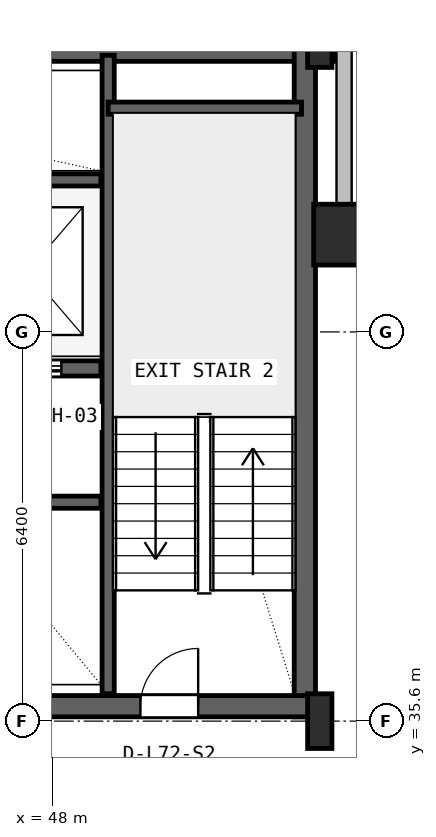
"""IFC4 building model, lengths in metres.
Left out: names, types, materials, properties, quantities, classifications, styles, units other than length and angle.
Written with IfcOpenShell. Run it as: python <this file> out.ifc"""

import sys

from ifc_helpers import new_model, si_unit, direction, frame, frame_2d, origin, origin_2d, place, context, subcontext, project, spatial, rectangle, hollow_rectangle, i_section, extrude, source, transform, mapped, element, fill, save


model = new_model("IFC4")
c1 = context("Model", 3, precision=1e-05, world=origin(), true_north=direction((0.0, 1.0)))
c2 = subcontext(c1, "Body", "Model", "MODEL_VIEW")
j1 = project(units=[si_unit("LENGTHUNIT", "METRE"), si_unit("PLANEANGLEUNIT", "RADIAN")], contexts=[c1])
p1 = place(None, origin())
s1 = spatial("IfcSite", under=j1, at=p1, CompositionType="ELEMENT")
p2 = place(p1, origin())
s2 = spatial("IfcBuilding", under=s1, at=p2, CompositionType="ELEMENT")
p3 = place(p2, frame((0.0, 0.0, 288.8)))
s3 = spatial("IfcBuildingStorey", under=s2, at=p3, CompositionType="ELEMENT", Elevation=288.8)
p4 = place(p3, frame((15.325, 46.625, 0.0), z_axis=(0.0, 0.0, 1.0), x_axis=(1.0, 0.0, 0.0)))
e1 = element("IfcWall", 1, at=p4, inside=s3, PredefinedType="SHEAR", context=c2, shape_type="SweptSolid", body=[
    extrude(rectangle(XDim=37.35, YDim=0.35, at=frame_2d((18.675, 0.0))), origin(), (0.0, 0.0, 1.0), 3.55),
])
p5 = place(p3, frame((52.155, 35.67, 0.0), z_axis=(0.0, 0.0, 1.0), x_axis=(0.0, 1.0, 0.0)))
e2 = element("IfcWall", 2, at=p5, inside=s3, PredefinedType="SHEAR", context=c2, shape_type="SweptSolid", body=[
    extrude(rectangle(XDim=11.13, YDim=0.35, at=frame_2d((5.565, 0.0))), origin(), (0.0, 0.0, 1.0), 3.55),
])
p6 = place(p3, frame((43.2, 35.845, 0.0), z_axis=(0.0, 0.0, 1.0), x_axis=(1.0, 0.0, 0.0)))
e3 = element("IfcWall", 3, at=p6, inside=s3, PredefinedType="SHEAR", context=c2, shape_type="SweptSolid", body=[
    extrude(rectangle(XDim=9.13, YDim=0.35, at=frame_2d((4.565, 0.0))), origin(), (0.0, 0.0, 1.0), 3.55),
])
p7 = place(p6, frame((6.25, 0.0, 0.0)))
e4 = element("IfcOpeningElement", 4, at=p7, cuts=e3, PredefinedType="OPENING", context=c2, shape_type="SweptSolid", body=[
    extrude(rectangle(XDim=0.95, YDim=2.1, at=frame_2d((0.475, 1.05))), frame((0.0, 0.185, 0.0), z_axis=(0.0, -1.0, 0.0), x_axis=(1.0, 0.0, 0.0)), (0.0, 0.0, 1.0), 0.37),
])
m1 = source(origin(), c2, "Body", "SweptSolid", [
    extrude(i_section(OverallWidth=0.4, OverallDepth=0.9, WebThickness=0.016, FlangeThickness=0.028, FilletRadius=0.016, at=origin_2d()), origin(), (0.0, 0.0, 1.0), 3.8),
])
for number, where, z_axis, x_axis in (
    (5, (52.4, 35.6, 0.0), (0.0, 0.0, 1.0), (1.0, 0.0, 0.0)),
    (6, (52.4, 46.8, 0.0), (0.0, 0.0, 1.0), (1.0, 0.0, 0.0)),
):
    element("IfcColumn", number, at=place(p3, frame(where, z_axis=z_axis, x_axis=x_axis)), inside=s3, PredefinedType="COLUMN", context=c2, shape_type="MappedRepresentation", body=[
        mapped(m1, transform((0.0, 0.0, 0.0), x_axis=(1.0, 0.0, 0.0), y_axis=(0.0, 1.0, 0.0), z_axis=(0.0, 0.0, 1.0), scale=1.0)),
    ])
m2 = source(origin(), c2, "Body", "SweptSolid", [
    extrude(hollow_rectangle(XDim=1.0, YDim=1.0, WallThickness=0.04, at=origin_2d()), origin(), (0.0, 0.0, 1.0), 3.8),
])
p8 = place(p3, frame((52.8, 43.6, 0.0), z_axis=(0.0, 0.0, 1.0), x_axis=(1.0, 0.0, 0.0)))
e7 = element("IfcColumn", 7, at=p8, inside=s3, PredefinedType="COLUMN", context=c2, shape_type="MappedRepresentation", body=[
    mapped(m2, transform((0.0, 0.0, 0.0), x_axis=(1.0, 0.0, 0.0), y_axis=(0.0, 1.0, 0.0), z_axis=(0.0, 0.0, 1.0), scale=1.0)),
])
p9 = place(p3, frame((52.93, 43.6, 0.0), z_axis=(0.0, 0.0, 1.0), x_axis=(1.0, 0.0, 0.0)))
e8 = element("IfcWall", 8, at=p9, inside=s3, PredefinedType="SOLIDWALL", context=c2, shape_type="SweptSolid", body=[
    extrude(rectangle(XDim=2.99, YDim=0.25, at=frame_2d((1.495, 0.0))), origin(), (0.0, 0.0, 1.0), 3.53),
])
p10 = place(p3, frame((52.8, 43.52, 0.0), z_axis=(0.0, 0.0, 1.0), x_axis=(0.0, 1.0, 0.0)))
e9 = element("IfcWall", 9, at=p10, inside=s3, PredefinedType="SOLIDWALL", context=c2, shape_type="SweptSolid", body=[
    extrude(rectangle(XDim=3.2, YDim=0.25, at=frame_2d((1.6, 0.0))), origin(), (0.0, 0.0, 1.0), 3.171),
])
p11 = place(p3, frame((48.92, 36.05, 0.0), z_axis=(0.0, 0.0, 1.0), x_axis=(0.0, 1.0, 0.0)))
e10 = element("IfcWall", 10, at=p11, inside=s3, PredefinedType="SHEAR", context=c2, shape_type="SweptSolid", body=[
    extrude(rectangle(XDim=10.5, YDim=0.2, at=frame_2d((5.25, 0.0))), origin(), (0.0, 0.0, 1.0), 3.55),
])
p12 = place(p3, frame((48.92, 45.68, 0.0), z_axis=(0.0, 0.0, 1.0), x_axis=(1.0, 0.0, 0.0)))
e11 = element("IfcWall", 11, at=p12, inside=s3, PredefinedType="SHEAR", context=c2, shape_type="SweptSolid", body=[
    extrude(rectangle(XDim=3.18, YDim=0.2, at=frame_2d((1.59, 0.0))), origin(), (0.0, 0.0, 1.0), 3.55),
])
p13 = place(p3, frame((24.98, 41.4, 0.0), z_axis=(0.0, 0.0, 1.0), x_axis=(1.0, 0.0, 0.0)))
e12 = element("IfcWall", 12, at=p13, inside=s3, PredefinedType="SHEAR", context=c2, shape_type="SweptSolid", body=[
    extrude(rectangle(XDim=23.82, YDim=0.25, at=frame_2d((11.91, 0.0))), origin(), (0.0, 0.0, 1.0), 3.55),
])
p14 = place(p13, frame((16.87, 0.0, 0.0)))
e13 = element("IfcOpeningElement", 13, at=p14, cuts=e12, PredefinedType="OPENING", context=c2, shape_type="SweptSolid", body=[
    extrude(rectangle(XDim=1.1, YDim=2.18, at=frame_2d((0.55, 1.09))), frame((0.0, 0.135, 0.0), z_axis=(0.0, -1.0, 0.0), x_axis=(1.0, 0.0, 0.0)), (0.0, 0.0, 1.0), 0.27),
])
p15 = place(p13, frame((19.47, 0.0, 0.0)))
e14 = element("IfcOpeningElement", 14, at=p15, cuts=e12, PredefinedType="OPENING", context=c2, shape_type="SweptSolid", body=[
    extrude(rectangle(XDim=1.1, YDim=2.18, at=frame_2d((0.55, 1.09))), frame((0.0, 0.135, 0.0), z_axis=(0.0, -1.0, 0.0), x_axis=(1.0, 0.0, 0.0)), (0.0, 0.0, 1.0), 0.27),
])
p16 = place(p13, frame((22.07, 0.0, 0.0)))
e15 = element("IfcOpeningElement", 15, at=p16, cuts=e12, PredefinedType="OPENING", context=c2, shape_type="SweptSolid", body=[
    extrude(rectangle(XDim=1.1, YDim=2.18, at=frame_2d((0.55, 1.09))), frame((0.0, 0.135, 0.0), z_axis=(0.0, -1.0, 0.0), x_axis=(1.0, 0.0, 0.0)), (0.0, 0.0, 1.0), 0.27),
])
p17 = place(p13, frame((0.96, 0.0, 0.0)))
e16 = element("IfcOpeningElement", 16, at=p17, cuts=e12, PredefinedType="OPENING", context=c2, shape_type="SweptSolid", body=[
    extrude(rectangle(XDim=1.0, YDim=2.08, at=frame_2d((0.5, 1.04))), frame((0.0, 0.135, 0.0), z_axis=(0.0, -1.0, 0.0), x_axis=(1.0, 0.0, 0.0)), (0.0, 0.0, 1.0), 0.27),
])
p18 = place(p13, frame((3.56, 0.0, 0.0)))
e17 = element("IfcOpeningElement", 17, at=p18, cuts=e12, PredefinedType="OPENING", context=c2, shape_type="SweptSolid", body=[
    extrude(rectangle(XDim=1.0, YDim=2.08, at=frame_2d((0.5, 1.04))), frame((0.0, 0.135, 0.0), z_axis=(0.0, -1.0, 0.0), x_axis=(1.0, 0.0, 0.0)), (0.0, 0.0, 1.0), 0.27),
])
p19 = place(p13, frame((6.16, 0.0, 0.0)))
e18 = element("IfcOpeningElement", 18, at=p19, cuts=e12, PredefinedType="OPENING", context=c2, shape_type="SweptSolid", body=[
    extrude(rectangle(XDim=0.92, YDim=2.08, at=frame_2d((0.46, 1.04))), frame((0.0, 0.135, 0.0), z_axis=(0.0, -1.0, 0.0), x_axis=(1.0, 0.0, 0.0)), (0.0, 0.0, 1.0), 0.27),
])
p20 = place(p13, frame((11.56, 0.0, 0.0)))
e19 = element("IfcOpeningElement", 19, at=p20, cuts=e12, PredefinedType="OPENING", context=c2, shape_type="SweptSolid", body=[
    extrude(rectangle(XDim=1.0, YDim=2.08, at=frame_2d((0.5, 1.04))), frame((0.0, 0.135, 0.0), z_axis=(0.0, -1.0, 0.0), x_axis=(1.0, 0.0, 0.0)), (0.0, 0.0, 1.0), 0.27),
])
p21 = place(p3, frame((41.22, 44.5, 0.0), z_axis=(0.0, 0.0, 1.0), x_axis=(1.0, 0.0, 0.0)))
e20 = element("IfcWall", 20, at=p21, inside=s3, PredefinedType="SHEAR", context=c2, shape_type="SweptSolid", body=[
    extrude(rectangle(XDim=7.58, YDim=0.2, at=frame_2d((3.79, 0.0))), origin(), (0.0, 0.0, 1.0), 3.55),
])
p22 = place(p3, frame((43.65, 39.2, 0.0), z_axis=(0.0, 0.0, 1.0), x_axis=(1.0, 0.0, 0.0)))
e21 = element("IfcWall", 21, at=p22, inside=s3, PredefinedType="SHEAR", context=c2, shape_type="SweptSolid", body=[
    extrude(rectangle(XDim=5.15, YDim=0.2, at=frame_2d((2.575, 0.0))), origin(), (0.0, 0.0, 1.0), 3.55),
])
m3 = source(origin(), c2, "Body", "SweptSolid", [
    extrude(rectangle(XDim=0.95, YDim=2.1, at=frame_2d((0.475, 1.05))), frame((0.0, 0.025, 0.0), z_axis=(0.0, -1.0, 0.0), x_axis=(1.0, 0.0, 0.0)), (0.0, 0.0, 1.0), 0.05),
])
p23 = place(p7, origin())
e22 = element("IfcDoor", 22, at=p23, inside=s3, OperationType="SINGLE_SWING_RIGHT", PredefinedType="DOOR", context=c2, shape_type="MappedRepresentation", body=[
    mapped(m3, transform((0.0, 0.0, 0.0), x_axis=(1.0, 0.0, 0.0), y_axis=(0.0, 1.0, 0.0), z_axis=(0.0, 0.0, 1.0), scale=1.0)),
])
fill(e4, e22)
m4 = source(origin(), c2, "Body", "SweptSolid", [
    extrude(rectangle(XDim=1.1, YDim=2.18, at=frame_2d((0.55, 1.09))), frame((0.0, 0.025, 0.0), z_axis=(0.0, -1.0, 0.0), x_axis=(1.0, 0.0, 0.0)), (0.0, 0.0, 1.0), 0.05),
])
p24 = place(p16, frame((1.1, 0.0, 0.0), z_axis=(0.0, 0.0, 1.0), x_axis=(-1.0, 0.0, 0.0)))
e23 = element("IfcDoor", 23, at=p24, inside=s3, OperationType="SLIDING_TO_LEFT", PredefinedType="DOOR", context=c2, shape_type="MappedRepresentation", body=[
    mapped(m4, transform((0.0, 0.0, 0.0), x_axis=(1.0, 0.0, 0.0), y_axis=(0.0, 1.0, 0.0), z_axis=(0.0, 0.0, 1.0), scale=1.0)),
])
fill(e15, e23)
save(model, sys.argv[1])
